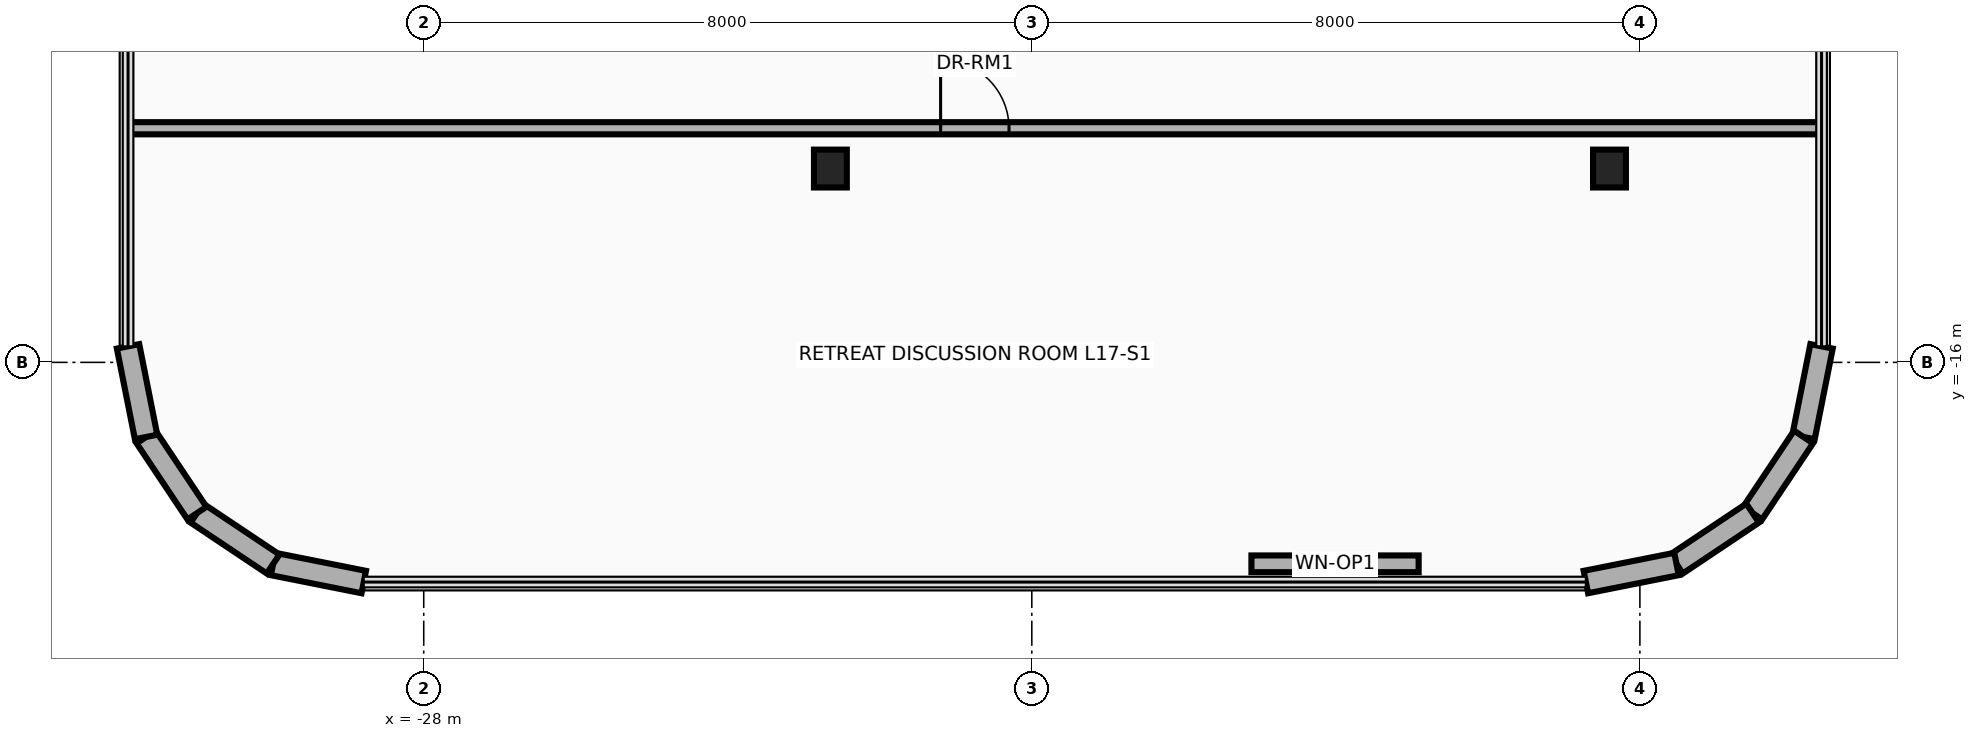
"""IFC4 building model, lengths in metres.
Left out: names, types, materials, properties, quantities, classifications, styles, units other than length and angle.
Written with IfcOpenShell. Run it as: python <this file> out.ifc"""

import sys

from ifc_helpers import new_model, si_unit, direction, frame, frame_2d, origin, origin_2d, place, context, subcontext, project, spatial, rectangle, i_section, extrude, source, transform, mapped, element, fill, save


model = new_model("IFC4")
c1 = context("Model", 3, precision=1e-05, world=origin(), true_north=direction((0.0, 1.0)))
c2 = subcontext(c1, "Body", "Model", "MODEL_VIEW")
j1 = project(units=[si_unit("LENGTHUNIT", "METRE"), si_unit("PLANEANGLEUNIT", "RADIAN")], contexts=[c1])
p1 = place(None, origin())
s1 = spatial("IfcSite", under=j1, at=p1, CompositionType="ELEMENT")
p2 = place(p1, origin())
s2 = spatial("IfcBuilding", under=s1, at=p2, CompositionType="ELEMENT")
p3 = place(p2, frame((0.0, 0.0, 70.4)))
s3 = spatial("IfcBuildingStorey", under=s2, at=p3, CompositionType="ELEMENT", Elevation=70.4)
m1 = source(origin(), c2, "Body", "SweptSolid", [
    extrude(i_section(OverallWidth=0.432, OverallDepth=0.498, WebThickness=0.056, FlangeThickness=0.089, at=origin_2d()), origin(), (0.0, 0.0, 1.0), 3.7),
])
for number, where, z_axis, x_axis in (
    (1, (-22.65, -13.45, 0.0), (0.0, 0.0, 1.0), (1.0, 0.0, 0.0)),
    (2, (-12.4, -13.45, 0.0), (0.0, 0.0, 1.0), (1.0, 0.0, 0.0)),
):
    element("IfcColumn", number, at=place(p3, frame(where, z_axis=z_axis, x_axis=x_axis)), inside=s3, PredefinedType="COLUMN", context=c2, shape_type="MappedRepresentation", body=[
        mapped(m1, transform((0.0, 0.0, 0.0), x_axis=(1.0, 0.0, 0.0), y_axis=(0.0, 1.0, 0.0), z_axis=(0.0, 0.0, 1.0), scale=1.0)),
    ])
p4 = place(p3, frame((-9.61, -15.789, 0.0), z_axis=(0.0, 0.0, 1.0), x_axis=(-0.194996050505, -0.980804027463, 0.0)))
e3 = element("IfcWall", 3, at=p4, inside=s3, PredefinedType="SOLIDWALL", context=c2, shape_type="SweptSolid", body=[
    extrude(rectangle(XDim=1.216, YDim=0.3, at=frame_2d((0.608, 0.0))), origin(), (0.0, 0.0, 1.0), 3.46),
])
for number, where, z_axis, x_axis in (
    (4, (-9.847, -16.982, 0.0), (0.0, 0.0, 1.0), (-0.556, -0.831, 0.0)),
    (5, (-10.517, -17.983, 0.0), (0.0, 0.0, 1.0), (-0.831, -0.556, 0.0)),
):
    element("IfcWall", number, at=place(p3, frame(where, z_axis=z_axis, x_axis=x_axis)), inside=s3, PredefinedType="SOLIDWALL", context=c2, shape_type="SweptSolid", body=[
        extrude(rectangle(XDim=1.205, YDim=0.3, at=frame_2d((0.603, 0.0))), origin(), (0.0, 0.0, 1.0), 3.46),
    ])
p5 = place(p3, frame((-11.518, -18.653, 0.0), z_axis=(0.0, 0.0, 1.0), x_axis=(-0.980804027463, -0.194996050505, 0.0)))
e6 = element("IfcWall", 6, at=p5, inside=s3, PredefinedType="SOLIDWALL", context=c2, shape_type="SweptSolid", body=[
    extrude(rectangle(XDim=1.216, YDim=0.3, at=frame_2d((0.608, 0.0))), origin(), (0.0, 0.0, 1.0), 3.46),
])
p6 = place(p3, frame((-14.911, -18.65, 0.0), z_axis=(0.0, 0.0, 1.0), x_axis=(-1.0, 0.0, 0.0)))
e7 = element("IfcWall", 7, at=p6, inside=s3, PredefinedType="SOLIDWALL", context=c2, shape_type="SweptSolid", body=[
    extrude(rectangle(XDim=2.2, YDim=0.22, at=frame_2d((1.1, 0.0))), origin(), (0.0, 0.0, 1.0), 3.46),
])
p7 = place(p6, frame((0.65, 0.0, 0.95)))
e8 = element("IfcOpeningElement", 8, at=p7, cuts=e7, PredefinedType="OPENING", context=c2, shape_type="SweptSolid", body=[
    extrude(rectangle(XDim=0.9, YDim=1.3, at=frame_2d((0.45, 0.65))), frame((0.0, 0.125, 0.0), z_axis=(0.0, -1.0, 0.0), x_axis=(1.0, 0.0, 0.0)), (0.0, 0.0, 1.0), 0.25),
])
p8 = place(p3, frame((-28.789, -18.89, 0.0), z_axis=(0.0, 0.0, 1.0), x_axis=(-0.980804027463, 0.194996050505, 0.0)))
e9 = element("IfcWall", 9, at=p8, inside=s3, PredefinedType="SOLIDWALL", context=c2, shape_type="SweptSolid", body=[
    extrude(rectangle(XDim=1.216, YDim=0.3, at=frame_2d((0.608, 0.0))), origin(), (0.0, 0.0, 1.0), 3.46),
])
for number, where, z_axis, x_axis in (
    (10, (-29.982, -18.653, 0.0), (0.0, 0.0, 1.0), (-0.831, 0.556, 0.0)),
    (11, (-30.983, -17.983, 0.0), (0.0, 0.0, 1.0), (-0.556, 0.831, 0.0)),
):
    element("IfcWall", number, at=place(p3, frame(where, z_axis=z_axis, x_axis=x_axis)), inside=s3, PredefinedType="SOLIDWALL", context=c2, shape_type="SweptSolid", body=[
        extrude(rectangle(XDim=1.205, YDim=0.3, at=frame_2d((0.603, 0.0))), origin(), (0.0, 0.0, 1.0), 3.46),
    ])
p9 = place(p3, frame((-31.653, -16.982, 0.0), z_axis=(0.0, 0.0, 1.0), x_axis=(-0.194996050505, 0.980804027463, 0.0)))
e12 = element("IfcWall", 12, at=p9, inside=s3, PredefinedType="SOLIDWALL", context=c2, shape_type="SweptSolid", body=[
    extrude(rectangle(XDim=1.216, YDim=0.3, at=frame_2d((0.608, 0.0))), origin(), (0.0, 0.0, 1.0), 3.46),
])
p10 = place(p3, frame((-31.89, -12.92, 0.0), z_axis=(0.0, 0.0, 1.0), x_axis=(1.0, 0.0, 0.0)))
e13 = element("IfcWall", 13, at=p10, inside=s3, PredefinedType="PARTITIONING", context=c2, shape_type="SweptSolid", body=[
    extrude(rectangle(XDim=22.28, YDim=0.16, at=frame_2d((11.14, 0.0))), origin(), (0.0, 0.0, 1.0), 2.834),
])
p11 = place(p10, frame((10.69, 0.0, 0.0)))
e14 = element("IfcOpeningElement", 14, at=p11, cuts=e13, PredefinedType="OPENING", context=c2, shape_type="SweptSolid", body=[
    extrude(rectangle(XDim=0.9, YDim=2.1, at=frame_2d((0.45, 1.05))), frame((0.0, 0.095, 0.0), z_axis=(0.0, -1.0, 0.0), x_axis=(1.0, 0.0, 0.0)), (0.0, 0.0, 1.0), 0.19),
])
p12 = place(p7, origin())
e15 = element("IfcWindow", 15, at=p12, inside=s3, PartitioningType="SINGLE_PANEL", PredefinedType="WINDOW", context=c2, shape_type="SweptSolid", body=[
    extrude(rectangle(XDim=0.9, YDim=1.3, at=frame_2d((0.45, 0.65))), frame((0.0, 0.03, 0.0), z_axis=(0.0, -1.0, 0.0), x_axis=(1.0, 0.0, 0.0)), (0.0, 0.0, 1.0), 0.06),
])
fill(e8, e15)
p13 = place(p11, origin())
e16 = element("IfcDoor", 16, at=p13, inside=s3, OperationType="SINGLE_SWING_RIGHT", PredefinedType="DOOR", context=c2, shape_type="SweptSolid", body=[
    extrude(rectangle(XDim=0.9, YDim=2.1, at=frame_2d((0.45, 1.05))), frame((0.0, 0.025, 0.0), z_axis=(0.0, -1.0, 0.0), x_axis=(1.0, 0.0, 0.0)), (0.0, 0.0, 1.0), 0.05),
])
fill(e14, e16)
save(model, sys.argv[1])
